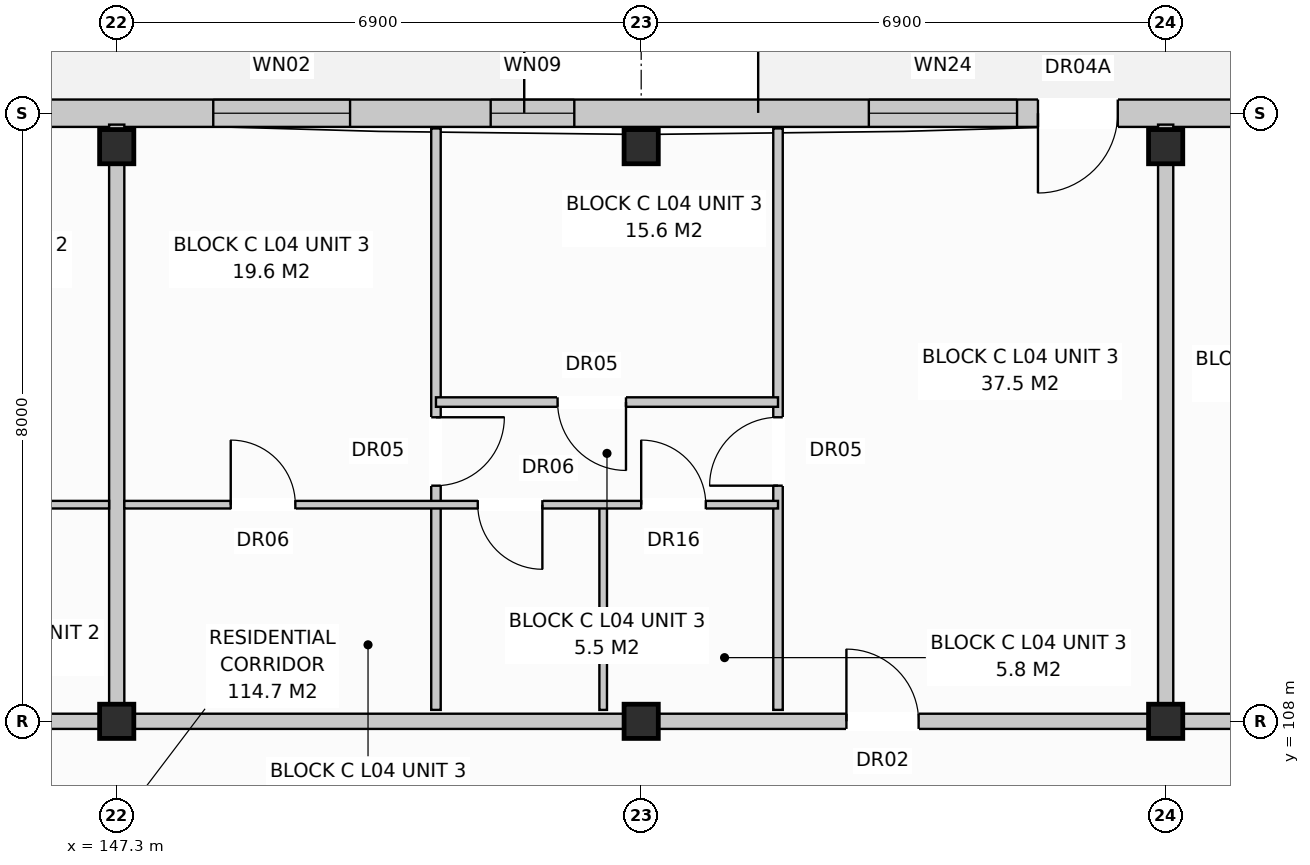
"""IFC4 building model, lengths in metres.
Left out: names, types, materials, properties, quantities, classifications, styles, units other than length and angle.
Written with IfcOpenShell. Run it as: python <this file> out.ifc"""

import sys

from ifc_helpers import new_model, si_unit, direction, frame, frame_2d, origin, origin_with_axes, origin_2d, place, context, subcontext, project, spatial, rectangle, extrude, element, fill, save


model = new_model("IFC4")
c1 = context("Model", 3, precision=1e-05, world=origin(), true_north=direction((0.0, 1.0)))
c2 = subcontext(c1, "Body", "Model", "MODEL_VIEW")
j1 = project(units=[si_unit("LENGTHUNIT", "METRE"), si_unit("PLANEANGLEUNIT", "RADIAN")], contexts=[c1])
p1 = place(None, origin())
s1 = spatial("IfcSite", under=j1, at=p1, CompositionType="ELEMENT")
p2 = place(p1, origin())
s2 = spatial("IfcBuilding", under=s1, at=p2, CompositionType="ELEMENT")
p3 = place(p2, frame((0.0, 0.0, 14.4)))
s3 = spatial("IfcBuildingStorey", under=s2, at=p3, CompositionType="ELEMENT", Elevation=14.4)
for number, where, z_axis, x_axis in (
    (1, (147.3, 108.0, 0.0), (0.0, 0.0, 1.0), (1.0, 0.0, 0.0)),
    (2, (147.3, 115.56, 0.0), (0.0, 0.0, 1.0), (1.0, 0.0, 0.0)),
    (3, (154.2, 108.0, 0.0), (0.0, 0.0, 1.0), (1.0, 0.0, 0.0)),
    (4, (154.2, 115.56, 0.0), (0.0, 0.0, 1.0), (1.0, 0.0, 0.0)),
    (5, (161.1, 108.0, 0.0), (0.0, 0.0, 1.0), (1.0, 0.0, 0.0)),
    (6, (161.1, 115.56, 0.0), (0.0, 0.0, 1.0), (1.0, 0.0, 0.0)),
):
    element("IfcColumn", number, at=place(p3, frame(where, z_axis=z_axis, x_axis=x_axis)), inside=s3, PredefinedType="COLUMN", context=c2, shape_type="SweptSolid", body=[
        extrude(rectangle(XDim=0.45, YDim=0.45, at=origin_2d()), origin(), (0.0, 0.0, 1.0), 3.2),
    ])
p4 = place(p3, frame((112.97, 116.0, 0.0), z_axis=(0.0, 0.0, 1.0), x_axis=(1.0, 0.0, 0.0)))
e7 = element("IfcWall", 7, at=p4, inside=s3, PredefinedType="STANDARD", context=c2, shape_type="SweptSolid", body=[
    extrude(rectangle(XDim=54.86, YDim=0.36, at=frame_2d((27.43, 0.0))), origin(), (0.0, 0.0, 1.0), 2.94),
])
p5 = place(p4, frame((3.779, 0.0, 0.0)))
e8 = element("IfcOpeningElement", 8, at=p5, cuts=e7, PredefinedType="OPENING", context=c2, shape_type="SweptSolid", body=[
    extrude(rectangle(XDim=1.05, YDim=2.12, at=frame_2d((0.525, 1.06))), frame((0.0, 0.192, 0.0), z_axis=(0.0, -1.0, 0.0), x_axis=(1.0, 0.0, 0.0)), (0.0, 0.0, 1.0), 0.384),
])
p6 = place(p4, frame((18.639, 0.0, 0.0)))
e9 = element("IfcOpeningElement", 9, at=p6, cuts=e7, PredefinedType="OPENING", context=c2, shape_type="SweptSolid", body=[
    extrude(rectangle(XDim=1.05, YDim=2.12, at=frame_2d((0.525, 1.06))), frame((0.0, 0.192, 0.0), z_axis=(0.0, -1.0, 0.0), x_axis=(1.0, 0.0, 0.0)), (0.0, 0.0, 1.0), 0.384),
])
p7 = place(p4, frame((29.039, 0.0, 0.0)))
e10 = element("IfcOpeningElement", 10, at=p7, cuts=e7, PredefinedType="OPENING", context=c2, shape_type="SweptSolid", body=[
    extrude(rectangle(XDim=1.05, YDim=2.12, at=frame_2d((0.525, 1.06))), frame((0.0, 0.192, 0.0), z_axis=(0.0, -1.0, 0.0), x_axis=(1.0, 0.0, 0.0)), (0.0, 0.0, 1.0), 0.384),
])
p8 = place(p4, frame((46.45, 0.0, 0.0)))
e11 = element("IfcOpeningElement", 11, at=p8, cuts=e7, PredefinedType="OPENING", context=c2, shape_type="SweptSolid", body=[
    extrude(rectangle(XDim=1.05, YDim=2.12, at=frame_2d((0.525, 1.06))), frame((0.0, 0.192, 0.0), z_axis=(0.0, -1.0, 0.0), x_axis=(1.0, 0.0, 0.0)), (0.0, 0.0, 1.0), 0.384),
])
p9 = place(p4, frame((1.525, 0.0, 0.8)))
e12 = element("IfcOpeningElement", 12, at=p9, cuts=e7, PredefinedType="OPENING", context=c2, shape_type="SweptSolid", body=[
    extrude(rectangle(XDim=1.95, YDim=1.65, at=frame_2d((0.975, 0.825))), frame((0.0, 0.192, 0.0), z_axis=(0.0, -1.0, 0.0), x_axis=(1.0, 0.0, 0.0)), (0.0, 0.0, 1.0), 0.384),
])
p10 = place(p4, frame((7.65, 0.0, 0.72)))
e13 = element("IfcOpeningElement", 13, at=p10, cuts=e7, PredefinedType="OPENING", context=c2, shape_type="SweptSolid", body=[
    extrude(rectangle(XDim=1.1, YDim=1.5, at=frame_2d((0.55, 0.75))), frame((0.0, 0.192, 0.0), z_axis=(0.0, -1.0, 0.0), x_axis=(1.0, 0.0, 0.0)), (0.0, 0.0, 1.0), 0.384),
])
p11 = place(p4, frame((10.45, 0.0, 0.8)))
e14 = element("IfcOpeningElement", 14, at=p11, cuts=e7, PredefinedType="OPENING", context=c2, shape_type="SweptSolid", body=[
    extrude(rectangle(XDim=1.9, YDim=1.85, at=frame_2d((0.95, 0.925))), frame((0.0, 0.192, 0.0), z_axis=(0.0, -1.0, 0.0), x_axis=(1.0, 0.0, 0.0)), (0.0, 0.0, 1.0), 0.384),
])
p12 = place(p4, frame((15.825, 0.0, 0.8)))
e15 = element("IfcOpeningElement", 15, at=p12, cuts=e7, PredefinedType="OPENING", context=c2, shape_type="SweptSolid", body=[
    extrude(rectangle(XDim=1.95, YDim=1.65, at=frame_2d((0.975, 0.825))), frame((0.0, 0.192, 0.0), z_axis=(0.0, -1.0, 0.0), x_axis=(1.0, 0.0, 0.0)), (0.0, 0.0, 1.0), 0.384),
])
p13 = place(p4, frame((21.6, 0.0, 0.8)))
e16 = element("IfcOpeningElement", 16, at=p13, cuts=e7, PredefinedType="OPENING", context=c2, shape_type="SweptSolid", body=[
    extrude(rectangle(XDim=1.8, YDim=1.7, at=frame_2d((0.9, 0.85))), frame((0.0, 0.192, 0.0), z_axis=(0.0, -1.0, 0.0), x_axis=(1.0, 0.0, 0.0)), (0.0, 0.0, 1.0), 0.384),
])
p14 = place(p4, frame((25.6, 0.0, 0.72)))
e17 = element("IfcOpeningElement", 17, at=p14, cuts=e7, PredefinedType="OPENING", context=c2, shape_type="SweptSolid", body=[
    extrude(rectangle(XDim=1.1, YDim=1.5, at=frame_2d((0.55, 0.75))), frame((0.0, 0.192, 0.0), z_axis=(0.0, -1.0, 0.0), x_axis=(1.0, 0.0, 0.0)), (0.0, 0.0, 1.0), 0.384),
])
p15 = place(p4, frame((31.325, 0.0, 0.8)))
e18 = element("IfcOpeningElement", 18, at=p15, cuts=e7, PredefinedType="OPENING", context=c2, shape_type="SweptSolid", body=[
    extrude(rectangle(XDim=1.95, YDim=1.65, at=frame_2d((0.975, 0.825))), frame((0.0, 0.192, 0.0), z_axis=(0.0, -1.0, 0.0), x_axis=(1.0, 0.0, 0.0)), (0.0, 0.0, 1.0), 0.384),
])
p16 = place(p4, frame((35.6, 0.0, 0.8)))
e19 = element("IfcOpeningElement", 19, at=p16, cuts=e7, PredefinedType="OPENING", context=c2, shape_type="SweptSolid", body=[
    extrude(rectangle(XDim=1.8, YDim=1.7, at=frame_2d((0.9, 0.85))), frame((0.0, 0.192, 0.0), z_axis=(0.0, -1.0, 0.0), x_axis=(1.0, 0.0, 0.0)), (0.0, 0.0, 1.0), 0.384),
])
p17 = place(p4, frame((39.25, 0.0, 0.72)))
e20 = element("IfcOpeningElement", 20, at=p17, cuts=e7, PredefinedType="OPENING", context=c2, shape_type="SweptSolid", body=[
    extrude(rectangle(XDim=1.1, YDim=1.5, at=frame_2d((0.55, 0.75))), frame((0.0, 0.192, 0.0), z_axis=(0.0, -1.0, 0.0), x_axis=(1.0, 0.0, 0.0)), (0.0, 0.0, 1.0), 0.384),
])
p18 = place(p4, frame((44.225, 0.0, 0.8)))
e21 = element("IfcOpeningElement", 21, at=p18, cuts=e7, PredefinedType="OPENING", context=c2, shape_type="SweptSolid", body=[
    extrude(rectangle(XDim=1.95, YDim=1.65, at=frame_2d((0.975, 0.825))), frame((0.0, 0.192, 0.0), z_axis=(0.0, -1.0, 0.0), x_axis=(1.0, 0.0, 0.0)), (0.0, 0.0, 1.0), 0.384),
])
p19 = place(p4, frame((49.2, 0.0, 0.8)))
e22 = element("IfcOpeningElement", 22, at=p19, cuts=e7, PredefinedType="OPENING", context=c2, shape_type="SweptSolid", body=[
    extrude(rectangle(XDim=1.8, YDim=1.7, at=frame_2d((0.9, 0.85))), frame((0.0, 0.192, 0.0), z_axis=(0.0, -1.0, 0.0), x_axis=(1.0, 0.0, 0.0)), (0.0, 0.0, 1.0), 0.384),
])
p20 = place(p4, frame((52.95, 0.0, 0.72)))
e23 = element("IfcOpeningElement", 23, at=p20, cuts=e7, PredefinedType="OPENING", context=c2, shape_type="SweptSolid", body=[
    extrude(rectangle(XDim=1.1, YDim=1.5, at=frame_2d((0.55, 0.75))), frame((0.0, 0.192, 0.0), z_axis=(0.0, -1.0, 0.0), x_axis=(1.0, 0.0, 0.0)), (0.0, 0.0, 1.0), 0.384),
])
p21 = place(p3, frame((147.3, 108.15, 0.0), z_axis=(0.0, 0.0, 1.0), x_axis=(0.0, 1.0, 0.0)))
e24 = element("IfcWall", 24, at=p21, inside=s3, PredefinedType="PARTITIONING", context=c2, shape_type="SweptSolid", body=[
    extrude(rectangle(XDim=7.7, YDim=0.2, at=frame_2d((3.85, 0.0))), origin(), (0.0, 0.0, 1.0), 2.94),
])
p22 = place(p3, frame((126.6, 108.0, 0.0), z_axis=(0.0, 0.0, 1.0), x_axis=(1.0, 0.0, 0.0)))
e25 = element("IfcWall", 25, at=p22, inside=s3, PredefinedType="PARTITIONING", context=c2, shape_type="SweptSolid", body=[
    extrude(rectangle(XDim=20.7, YDim=0.2, at=frame_2d((10.35, 0.0))), origin(), (0.0, 0.0, 1.0), 2.38),
])
p23 = place(p22, frame((2.4, 0.0, 0.0)))
e26 = element("IfcOpeningElement", 26, at=p23, cuts=e25, PredefinedType="OPENING", context=c2, shape_type="SweptSolid", body=[
    extrude(rectangle(XDim=0.95, YDim=2.15, at=frame_2d((0.475, 1.075))), frame((0.0, 0.112, 0.0), z_axis=(0.0, -1.0, 0.0), x_axis=(1.0, 0.0, 0.0)), (0.0, 0.0, 1.0), 0.224),
])
p24 = place(p3, frame((132.9, 110.85, 0.0), z_axis=(0.0, 0.0, 1.0), x_axis=(1.0, 0.0, 0.0)))
e27 = element("IfcWall", 27, at=p24, inside=s3, PredefinedType="PARTITIONING", context=c2, shape_type="SweptSolid", body=[
    extrude(rectangle(XDim=14.3, YDim=0.1, at=frame_2d((7.15, 0.0))), origin(), (0.0, 0.0, 1.0), 2.94),
])
p25 = place(p24, frame((1.6, 0.0, 0.0)))
e28 = element("IfcOpeningElement", 28, at=p25, cuts=e27, PredefinedType="OPENING", context=c2, shape_type="SweptSolid", body=[
    extrude(rectangle(XDim=0.9, YDim=2.1, at=frame_2d((0.45, 1.05))), frame((0.0, 0.062, 0.0), z_axis=(0.0, -1.0, 0.0), x_axis=(1.0, 0.0, 0.0)), (0.0, 0.0, 1.0), 0.124),
])
p26 = place(p24, frame((5.1, 0.0, 0.0)))
e29 = element("IfcOpeningElement", 29, at=p26, cuts=e27, PredefinedType="OPENING", context=c2, shape_type="SweptSolid", body=[
    extrude(rectangle(XDim=0.85, YDim=2.05, at=frame_2d((0.425, 1.025))), frame((0.0, 0.062, 0.0), z_axis=(0.0, -1.0, 0.0), x_axis=(1.0, 0.0, 0.0)), (0.0, 0.0, 1.0), 0.124),
])
p27 = place(p24, frame((8.2, 0.0, 0.0)))
e30 = element("IfcOpeningElement", 30, at=p27, cuts=e27, PredefinedType="OPENING", context=c2, shape_type="SweptSolid", body=[
    extrude(rectangle(XDim=0.85, YDim=2.05, at=frame_2d((0.425, 1.025))), frame((0.0, 0.062, 0.0), z_axis=(0.0, -1.0, 0.0), x_axis=(1.0, 0.0, 0.0)), (0.0, 0.0, 1.0), 0.124),
])
p28 = place(p24, frame((11.6, 0.0, 0.0)))
e31 = element("IfcOpeningElement", 31, at=p28, cuts=e27, PredefinedType="OPENING", context=c2, shape_type="SweptSolid", body=[
    extrude(rectangle(XDim=0.85, YDim=2.05, at=frame_2d((0.425, 1.025))), frame((0.0, 0.062, 0.0), z_axis=(0.0, -1.0, 0.0), x_axis=(1.0, 0.0, 0.0)), (0.0, 0.0, 1.0), 0.124),
])
p29 = place(p3, frame((161.1, 108.15, 0.0), z_axis=(0.0, 0.0, 1.0), x_axis=(0.0, 1.0, 0.0)))
e32 = element("IfcWall", 32, at=p29, inside=s3, PredefinedType="PARTITIONING", context=c2, shape_type="SweptSolid", body=[
    extrude(rectangle(XDim=7.7, YDim=0.2, at=frame_2d((3.85, 0.0))), origin(), (0.0, 0.0, 1.0), 2.38),
])
p30 = place(p3, frame((147.3, 108.0, 0.0), z_axis=(0.0, 0.0, 1.0), x_axis=(1.0, 0.0, 0.0)))
e33 = element("IfcWall", 33, at=p30, inside=s3, PredefinedType="PARTITIONING", context=c2, shape_type="SweptSolid", body=[
    extrude(rectangle(XDim=13.8, YDim=0.2, at=frame_2d((6.9, 0.0))), origin(), (0.0, 0.0, 1.0), 2.38),
])
p31 = place(p30, frame((9.6, 0.0, 0.0)))
e34 = element("IfcOpeningElement", 34, at=p31, cuts=e33, PredefinedType="OPENING", context=c2, shape_type="SweptSolid", body=[
    extrude(rectangle(XDim=0.95, YDim=2.15, at=frame_2d((0.475, 1.075))), frame((0.0, 0.112, 0.0), z_axis=(0.0, -1.0, 0.0), x_axis=(1.0, 0.0, 0.0)), (0.0, 0.0, 1.0), 0.224),
])
p32 = place(p3, frame((156.0, 108.15, 0.0), z_axis=(0.0, 0.0, 1.0), x_axis=(0.0, 1.0, 0.0)))
e35 = element("IfcWall", 35, at=p32, inside=s3, PredefinedType="PARTITIONING", context=c2, shape_type="SweptSolid", body=[
    extrude(rectangle(XDim=7.65, YDim=0.125, at=frame_2d((3.825, 0.0))), origin(), (0.0, 0.0, 1.0), 2.94),
])
p33 = place(p32, frame((2.95, 0.0, 0.0)))
e36 = element("IfcOpeningElement", 36, at=p33, cuts=e35, PredefinedType="OPENING", context=c2, shape_type="SweptSolid", body=[
    extrude(rectangle(XDim=0.9, YDim=2.1, at=frame_2d((0.45, 1.05))), frame((0.0, 0.074, 0.0), z_axis=(0.0, -1.0, 0.0), x_axis=(1.0, 0.0, 0.0)), (0.0, 0.0, 1.0), 0.149),
])
p34 = place(p3, frame((151.5, 108.15, 0.0), z_axis=(0.0, 0.0, 1.0), x_axis=(0.0, 1.0, 0.0)))
e37 = element("IfcWall", 37, at=p34, inside=s3, PredefinedType="PARTITIONING", context=c2, shape_type="SweptSolid", body=[
    extrude(rectangle(XDim=7.65, YDim=0.125, at=frame_2d((3.825, 0.0))), origin(), (0.0, 0.0, 1.0), 2.94),
])
p35 = place(p34, frame((2.95, 0.0, 0.0)))
e38 = element("IfcOpeningElement", 38, at=p35, cuts=e37, PredefinedType="OPENING", context=c2, shape_type="SweptSolid", body=[
    extrude(rectangle(XDim=0.9, YDim=2.1, at=frame_2d((0.45, 1.05))), frame((0.0, 0.074, 0.0), z_axis=(0.0, -1.0, 0.0), x_axis=(1.0, 0.0, 0.0)), (0.0, 0.0, 1.0), 0.149),
])
p36 = place(p3, frame((153.7, 108.15, 0.0), z_axis=(0.0, 0.0, 1.0), x_axis=(0.0, 1.0, 0.0)))
e39 = element("IfcWall", 39, at=p36, inside=s3, PredefinedType="PARTITIONING", context=c2, shape_type="SweptSolid", body=[
    extrude(rectangle(XDim=2.7, YDim=0.1, at=frame_2d((1.35, 0.0))), origin(), (0.0, 0.0, 1.0), 2.94),
])
p37 = place(p3, frame((147.4, 110.85, 0.0), z_axis=(0.0, 0.0, 1.0), x_axis=(1.0, 0.0, 0.0)))
e40 = element("IfcWall", 40, at=p37, inside=s3, PredefinedType="PARTITIONING", context=c2, shape_type="SweptSolid", body=[
    extrude(rectangle(XDim=8.6, YDim=0.1, at=frame_2d((4.3, 0.0))), origin(), (0.0, 0.0, 1.0), 2.94),
])
p38 = place(p37, frame((1.4, 0.0, 0.0)))
e41 = element("IfcOpeningElement", 41, at=p38, cuts=e40, PredefinedType="OPENING", context=c2, shape_type="SweptSolid", body=[
    extrude(rectangle(XDim=0.85, YDim=2.05, at=frame_2d((0.425, 1.025))), frame((0.0, 0.062, 0.0), z_axis=(0.0, -1.0, 0.0), x_axis=(1.0, 0.0, 0.0)), (0.0, 0.0, 1.0), 0.124),
])
p39 = place(p37, frame((4.65, 0.0, 0.0)))
e42 = element("IfcOpeningElement", 42, at=p39, cuts=e40, PredefinedType="OPENING", context=c2, shape_type="SweptSolid", body=[
    extrude(rectangle(XDim=0.85, YDim=2.05, at=frame_2d((0.425, 1.025))), frame((0.0, 0.062, 0.0), z_axis=(0.0, -1.0, 0.0), x_axis=(1.0, 0.0, 0.0)), (0.0, 0.0, 1.0), 0.124),
])
p40 = place(p37, frame((6.8, 0.0, 0.0)))
e43 = element("IfcOpeningElement", 43, at=p40, cuts=e40, PredefinedType="OPENING", context=c2, shape_type="SweptSolid", body=[
    extrude(rectangle(XDim=0.85, YDim=2.1, at=frame_2d((0.425, 1.05))), frame((0.0, 0.062, 0.0), z_axis=(0.0, -1.0, 0.0), x_axis=(1.0, 0.0, 0.0)), (0.0, 0.0, 1.0), 0.124),
])
p41 = place(p3, frame((151.5, 112.2, 0.0), z_axis=(0.0, 0.0, 1.0), x_axis=(1.0, 0.0, 0.0)))
e44 = element("IfcWall", 44, at=p41, inside=s3, PredefinedType="PARTITIONING", context=c2, shape_type="SweptSolid", body=[
    extrude(rectangle(XDim=4.5, YDim=0.125, at=frame_2d((2.25, 0.0))), origin(), (0.0, 0.0, 1.0), 2.94),
])
p42 = place(p41, frame((1.6, 0.0, 0.0)))
e45 = element("IfcOpeningElement", 45, at=p42, cuts=e44, PredefinedType="OPENING", context=c2, shape_type="SweptSolid", body=[
    extrude(rectangle(XDim=0.9, YDim=2.1, at=frame_2d((0.45, 1.05))), frame((0.0, 0.074, 0.0), z_axis=(0.0, -1.0, 0.0), x_axis=(1.0, 0.0, 0.0)), (0.0, 0.0, 1.0), 0.149),
])
p43 = place(p3, frame((161.1, 108.0, 0.0), z_axis=(0.0, 0.0, 1.0), x_axis=(1.0, 0.0, 0.0)))
e46 = element("IfcWall", 46, at=p43, inside=s3, PredefinedType="PARTITIONING", context=c2, shape_type="SweptSolid", body=[
    extrude(rectangle(XDim=6.9, YDim=0.2, at=frame_2d((3.45, 0.0))), origin(), (0.0, 0.0, 1.0), 2.38),
])
p44 = place(p43, frame((2.0, 0.0, 0.0)))
e47 = element("IfcOpeningElement", 47, at=p44, cuts=e46, PredefinedType="OPENING", context=c2, shape_type="SweptSolid", body=[
    extrude(rectangle(XDim=0.95, YDim=2.15, at=frame_2d((0.475, 1.075))), frame((0.0, 0.112, 0.0), z_axis=(0.0, -1.0, 0.0), x_axis=(1.0, 0.0, 0.0)), (0.0, 0.0, 1.0), 0.224),
])
p45 = place(p8, frame((1.05, 0.0, 0.0), z_axis=(0.0, 0.0, 1.0), x_axis=(-1.0, 0.0, 0.0)))
e48 = element("IfcDoor", 48, at=p45, inside=s3, OperationType="SINGLE_SWING_LEFT", PredefinedType="DOOR", context=c2, shape_type="SweptSolid", body=[
    extrude(rectangle(XDim=1.05, YDim=2.12, at=frame_2d((0.525, 1.06))), frame((0.0, 0.025, 0.0), z_axis=(0.0, -1.0, 0.0), x_axis=(1.0, 0.0, 0.0)), (0.0, 0.0, 1.0), 0.05),
])
fill(e11, e48)
p46 = place(p16, origin_with_axes())
e49 = element("IfcWindow", 49, at=p46, inside=s3, PartitioningType="SINGLE_PANEL", PredefinedType="WINDOW", context=c2, shape_type="SweptSolid", body=[
    extrude(rectangle(XDim=1.8, YDim=1.7, at=frame_2d((0.9, 0.85))), frame((0.0, 0.03, 0.0), z_axis=(0.0, -1.0, 0.0), x_axis=(1.0, 0.0, 0.0)), (0.0, 0.0, 1.0), 0.06),
])
fill(e19, e49)
p47 = place(p17, origin_with_axes())
e50 = element("IfcWindow", 50, at=p47, inside=s3, PartitioningType="SINGLE_PANEL", PredefinedType="WINDOW", context=c2, shape_type="SweptSolid", body=[
    extrude(rectangle(XDim=1.1, YDim=1.5, at=frame_2d((0.55, 0.75))), frame((0.0, 0.03, 0.0), z_axis=(0.0, -1.0, 0.0), x_axis=(1.0, 0.0, 0.0)), (0.0, 0.0, 1.0), 0.06),
])
fill(e20, e50)
p48 = place(p18, origin_with_axes())
e51 = element("IfcWindow", 51, at=p48, inside=s3, PartitioningType="SINGLE_PANEL", PredefinedType="WINDOW", context=c2, shape_type="SweptSolid", body=[
    extrude(rectangle(XDim=1.95, YDim=1.65, at=frame_2d((0.975, 0.825))), frame((0.0, 0.03, 0.0), z_axis=(0.0, -1.0, 0.0), x_axis=(1.0, 0.0, 0.0)), (0.0, 0.0, 1.0), 0.06),
])
fill(e21, e51)
p49 = place(p31, origin_with_axes())
e52 = element("IfcDoor", 52, at=p49, inside=s3, OperationType="SINGLE_SWING_LEFT", PredefinedType="DOOR", context=c2, shape_type="SweptSolid", body=[
    extrude(rectangle(XDim=0.95, YDim=2.15, at=frame_2d((0.475, 1.075))), frame((0.0, 0.025, 0.0), z_axis=(0.0, -1.0, 0.0), x_axis=(1.0, 0.0, 0.0)), (0.0, 0.0, 1.0), 0.05),
])
fill(e34, e52)
p50 = place(p33, origin_with_axes())
e53 = element("IfcDoor", 53, at=p50, inside=s3, OperationType="SINGLE_SWING_LEFT", PredefinedType="DOOR", context=c2, shape_type="SweptSolid", body=[
    extrude(rectangle(XDim=0.9, YDim=2.1, at=frame_2d((0.45, 1.05))), frame((0.0, 0.025, 0.0), z_axis=(0.0, -1.0, 0.0), x_axis=(1.0, 0.0, 0.0)), (0.0, 0.0, 1.0), 0.05),
])
fill(e36, e53)
p51 = place(p35, frame((0.9, 0.0, 0.0), z_axis=(0.0, 0.0, 1.0), x_axis=(-1.0, 0.0, 0.0)))
e54 = element("IfcDoor", 54, at=p51, inside=s3, OperationType="SINGLE_SWING_RIGHT", PredefinedType="DOOR", context=c2, shape_type="SweptSolid", body=[
    extrude(rectangle(XDim=0.9, YDim=2.1, at=frame_2d((0.45, 1.05))), frame((0.0, 0.025, 0.0), z_axis=(0.0, -1.0, 0.0), x_axis=(1.0, 0.0, 0.0)), (0.0, 0.0, 1.0), 0.05),
])
fill(e38, e54)
p52 = place(p38, origin_with_axes())
e55 = element("IfcDoor", 55, at=p52, inside=s3, OperationType="SINGLE_SWING_LEFT", PredefinedType="DOOR", context=c2, shape_type="SweptSolid", body=[
    extrude(rectangle(XDim=0.85, YDim=2.05, at=frame_2d((0.425, 1.025))), frame((0.0, 0.025, 0.0), z_axis=(0.0, -1.0, 0.0), x_axis=(1.0, 0.0, 0.0)), (0.0, 0.0, 1.0), 0.05),
])
fill(e41, e55)
p53 = place(p39, frame((0.85, 0.0, 0.0), z_axis=(0.0, 0.0, 1.0), x_axis=(-1.0, 0.0, 0.0)))
e56 = element("IfcDoor", 56, at=p53, inside=s3, OperationType="SINGLE_SWING_RIGHT", PredefinedType="DOOR", context=c2, shape_type="SweptSolid", body=[
    extrude(rectangle(XDim=0.85, YDim=2.05, at=frame_2d((0.425, 1.025))), frame((0.0, 0.025, 0.0), z_axis=(0.0, -1.0, 0.0), x_axis=(1.0, 0.0, 0.0)), (0.0, 0.0, 1.0), 0.05),
])
fill(e42, e56)
p54 = place(p40, origin_with_axes())
e57 = element("IfcDoor", 57, at=p54, inside=s3, OperationType="SINGLE_SWING_LEFT", PredefinedType="DOOR", context=c2, shape_type="SweptSolid", body=[
    extrude(rectangle(XDim=0.85, YDim=2.1, at=frame_2d((0.425, 1.05))), frame((0.0, 0.025, 0.0), z_axis=(0.0, -1.0, 0.0), x_axis=(1.0, 0.0, 0.0)), (0.0, 0.0, 1.0), 0.05),
])
fill(e43, e57)
p55 = place(p42, frame((0.9, 0.0, 0.0), z_axis=(0.0, 0.0, 1.0), x_axis=(-1.0, 0.0, 0.0)))
e58 = element("IfcDoor", 58, at=p55, inside=s3, OperationType="SINGLE_SWING_RIGHT", PredefinedType="DOOR", context=c2, shape_type="SweptSolid", body=[
    extrude(rectangle(XDim=0.9, YDim=2.1, at=frame_2d((0.45, 1.05))), frame((0.0, 0.025, 0.0), z_axis=(0.0, -1.0, 0.0), x_axis=(1.0, 0.0, 0.0)), (0.0, 0.0, 1.0), 0.05),
])
fill(e45, e58)
save(model, sys.argv[1])
